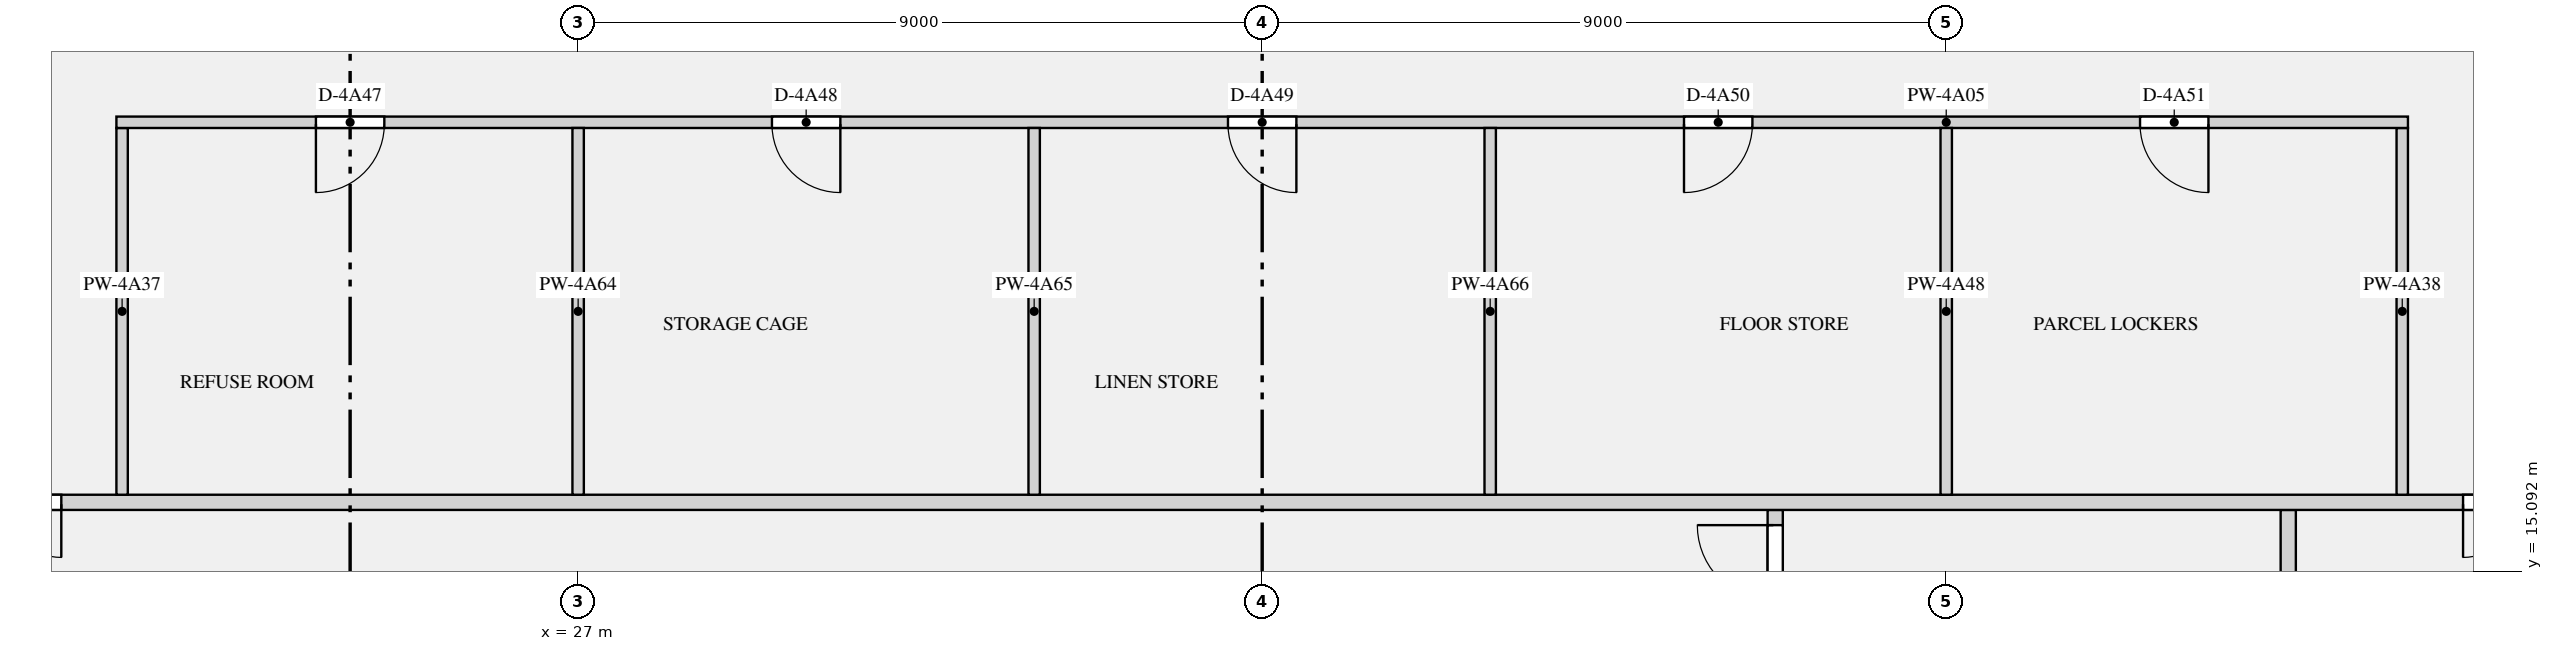
"""IFC4 building model, lengths in metres.
Left out: names, types, materials, properties, quantities, classifications, styles, units other than length and angle.
Written with IfcOpenShell. Run it as: python <this file> out.ifc"""

import sys

from ifc_helpers import new_model, si_unit, direction, frame, frame_2d, origin, place, context, subcontext, project, spatial, rectangle, extrude, element, fill, save


model = new_model("IFC4")
c1 = context("Model", 3, precision=1e-05, world=origin(), true_north=direction((0.0, 1.0)))
c2 = subcontext(c1, "Body", "Model", "MODEL_VIEW")
j1 = project(units=[si_unit("LENGTHUNIT", "METRE"), si_unit("PLANEANGLEUNIT", "RADIAN")], contexts=[c1])
p1 = place(None, origin())
s1 = spatial("IfcSite", under=j1, at=p1, CompositionType="ELEMENT")
p2 = place(p1, origin())
s2 = spatial("IfcBuilding", under=s1, at=p2, CompositionType="ELEMENT")
p3 = place(p2, frame((0.0, 0.0, 198.0)))
s3 = spatial("IfcBuildingStorey", under=s2, at=p3, CompositionType="ELEMENT", Elevation=198.0)
p4 = place(p3, frame((42.75, 12.5, 0.0), z_axis=(0.0, 0.0, 1.0), x_axis=(0.0, 1.0, 0.0)))
e1 = element("IfcWall", 1, at=p4, inside=s3, PredefinedType="PARTITIONING", context=c2, shape_type="SweptSolid", body=[
    extrude(rectangle(XDim=3.4, YDim=0.2, at=frame_2d((1.7, 0.0))), origin(), (0.0, 0.0, 1.0), 2.83),
])
p5 = place(p4, frame((2.2, 0.0, 0.0)))
e2 = element("IfcOpeningElement", 2, at=p5, cuts=e1, PredefinedType="OPENING", context=c2, shape_type="SweptSolid", body=[
    extrude(rectangle(XDim=1.0, YDim=2.1, at=frame_2d((0.5, 1.05))), frame((0.0, 0.11, 0.0), z_axis=(0.0, -1.0, 0.0), x_axis=(1.0, 0.0, 0.0)), (0.0, 0.0, 1.0), 0.22),
])
p6 = place(p3, frame((49.5, 12.5, 0.0), z_axis=(0.0, 0.0, 1.0), x_axis=(0.0, 1.0, 0.0)))
e3 = element("IfcWall", 3, at=p6, inside=s3, PredefinedType="PARTITIONING", context=c2, shape_type="SweptSolid", body=[
    extrude(rectangle(XDim=3.4, YDim=0.2, at=frame_2d((1.7, 0.0))), origin(), (0.0, 0.0, 1.0), 2.83),
])
p7 = place(p6, frame((1.15, 0.0, 0.0)))
e4 = element("IfcOpeningElement", 4, at=p7, cuts=e3, PredefinedType="OPENING", context=c2, shape_type="SweptSolid", body=[
    extrude(rectangle(XDim=1.1, YDim=2.1, at=frame_2d((0.55, 1.05))), frame((0.0, 0.11, 0.0), z_axis=(0.0, -1.0, 0.0), x_axis=(1.0, 0.0, 0.0)), (0.0, 0.0, 1.0), 0.22),
])
p8 = place(p3, frame((20.925, 21.0, 0.0), z_axis=(0.0, 0.0, 1.0), x_axis=(1.0, 0.0, 0.0)))
e5 = element("IfcWall", 5, at=p8, inside=s3, PredefinedType="PARTITIONING", context=c2, shape_type="SweptSolid", body=[
    extrude(rectangle(XDim=30.15, YDim=0.15, at=frame_2d((15.075, 0.0))), origin(), (0.0, 0.0, 1.0), 2.83),
])
p9 = place(p8, frame((2.625, 0.0, 0.0)))
e6 = element("IfcOpeningElement", 6, at=p9, cuts=e5, PredefinedType="OPENING", context=c2, shape_type="SweptSolid", body=[
    extrude(rectangle(XDim=0.9, YDim=2.1, at=frame_2d((0.45, 1.05))), frame((0.0, 0.085, 0.0), z_axis=(0.0, -1.0, 0.0), x_axis=(1.0, 0.0, 0.0)), (0.0, 0.0, 1.0), 0.17),
])
p10 = place(p8, frame((8.625, 0.0, 0.0)))
e7 = element("IfcOpeningElement", 7, at=p10, cuts=e5, PredefinedType="OPENING", context=c2, shape_type="SweptSolid", body=[
    extrude(rectangle(XDim=0.9, YDim=2.1, at=frame_2d((0.45, 1.05))), frame((0.0, 0.085, 0.0), z_axis=(0.0, -1.0, 0.0), x_axis=(1.0, 0.0, 0.0)), (0.0, 0.0, 1.0), 0.17),
])
p11 = place(p8, frame((14.625, 0.0, 0.0)))
e8 = element("IfcOpeningElement", 8, at=p11, cuts=e5, PredefinedType="OPENING", context=c2, shape_type="SweptSolid", body=[
    extrude(rectangle(XDim=0.9, YDim=2.1, at=frame_2d((0.45, 1.05))), frame((0.0, 0.085, 0.0), z_axis=(0.0, -1.0, 0.0), x_axis=(1.0, 0.0, 0.0)), (0.0, 0.0, 1.0), 0.17),
])
p12 = place(p8, frame((20.625, 0.0, 0.0)))
e9 = element("IfcOpeningElement", 9, at=p12, cuts=e5, PredefinedType="OPENING", context=c2, shape_type="SweptSolid", body=[
    extrude(rectangle(XDim=0.9, YDim=2.1, at=frame_2d((0.45, 1.05))), frame((0.0, 0.085, 0.0), z_axis=(0.0, -1.0, 0.0), x_axis=(1.0, 0.0, 0.0)), (0.0, 0.0, 1.0), 0.17),
])
p13 = place(p8, frame((26.625, 0.0, 0.0)))
e10 = element("IfcOpeningElement", 10, at=p13, cuts=e5, PredefinedType="OPENING", context=c2, shape_type="SweptSolid", body=[
    extrude(rectangle(XDim=0.9, YDim=2.1, at=frame_2d((0.45, 1.05))), frame((0.0, 0.085, 0.0), z_axis=(0.0, -1.0, 0.0), x_axis=(1.0, 0.0, 0.0)), (0.0, 0.0, 1.0), 0.17),
])
p14 = place(p3, frame((17.9, 16.0, 0.0), z_axis=(0.0, 0.0, 1.0), x_axis=(1.0, 0.0, 0.0)))
e11 = element("IfcWall", 11, at=p14, inside=s3, PredefinedType="PARTITIONING", context=c2, shape_type="SweptSolid", body=[
    extrude(rectangle(XDim=36.2, YDim=0.2, at=frame_2d((18.1, 0.0))), origin(), (0.0, 0.0, 1.0), 2.83),
])
p15 = place(p14, frame((0.9, 0.0, 0.0)))
e12 = element("IfcOpeningElement", 12, at=p15, cuts=e11, PredefinedType="OPENING", context=c2, shape_type="SweptSolid", body=[
    extrude(rectangle(XDim=1.4, YDim=2.1, at=frame_2d((0.7, 1.05))), frame((0.0, 0.11, 0.0), z_axis=(0.0, -1.0, 0.0), x_axis=(1.0, 0.0, 0.0)), (0.0, 0.0, 1.0), 0.22),
])
p16 = place(p14, frame((33.9, 0.0, 0.0)))
e13 = element("IfcOpeningElement", 13, at=p16, cuts=e11, PredefinedType="OPENING", context=c2, shape_type="SweptSolid", body=[
    extrude(rectangle(XDim=1.4, YDim=2.1, at=frame_2d((0.7, 1.05))), frame((0.0, 0.11, 0.0), z_axis=(0.0, -1.0, 0.0), x_axis=(1.0, 0.0, 0.0)), (0.0, 0.0, 1.0), 0.22),
])
for number, where, z_axis, x_axis in (
    (14, (21.0, 16.1, 0.0), (0.0, 0.0, 1.0), (0.0, 1.0, 0.0)),
    (15, (51.0, 16.1, 0.0), (0.0, 0.0, 1.0), (0.0, 1.0, 0.0)),
    (16, (45.0, 16.1, 0.0), (0.0, 0.0, 1.0), (0.0, 1.0, 0.0)),
    (17, (27.0, 16.1, 0.0), (0.0, 0.0, 1.0), (0.0, 1.0, 0.0)),
    (18, (33.0, 16.1, 0.0), (0.0, 0.0, 1.0), (0.0, 1.0, 0.0)),
    (19, (39.0, 16.1, 0.0), (0.0, 0.0, 1.0), (0.0, 1.0, 0.0)),
):
    element("IfcWall", number, at=place(p3, frame(where, z_axis=z_axis, x_axis=x_axis)), inside=s3, PredefinedType="PARTITIONING", context=c2, shape_type="SweptSolid", body=[
        extrude(rectangle(XDim=4.825, YDim=0.15, at=frame_2d((2.413, 0.0))), origin(), (0.0, 0.0, 1.0), 2.83),
    ])
p17 = place(p5, origin())
e20 = element("IfcDoor", 20, at=p17, inside=s3, OperationType="SINGLE_SWING_RIGHT", PredefinedType="DOOR", context=c2, shape_type="SweptSolid", body=[
    extrude(rectangle(XDim=1.0, YDim=2.1, at=frame_2d((0.5, 1.05))), frame((0.0, 0.025, 0.0), z_axis=(0.0, -1.0, 0.0), x_axis=(1.0, 0.0, 0.0)), (0.0, 0.0, 1.0), 0.05),
])
fill(e2, e20)
p18 = place(p15, frame((1.4, 0.0, 0.0), z_axis=(0.0, 0.0, 1.0), x_axis=(-1.0, 0.0, 0.0)))
e21 = element("IfcDoor", 21, at=p18, inside=s3, OperationType="DOUBLE_DOOR_SINGLE_SWING", PredefinedType="DOOR", context=c2, shape_type="SweptSolid", body=[
    extrude(rectangle(XDim=1.4, YDim=2.1, at=frame_2d((0.7, 1.05))), frame((0.0, 0.025, 0.0), z_axis=(0.0, -1.0, 0.0), x_axis=(1.0, 0.0, 0.0)), (0.0, 0.0, 1.0), 0.05),
])
fill(e12, e21)
p19 = place(p16, frame((1.4, 0.0, 0.0), z_axis=(0.0, 0.0, 1.0), x_axis=(-1.0, 0.0, 0.0)))
e22 = element("IfcDoor", 22, at=p19, inside=s3, OperationType="DOUBLE_DOOR_SINGLE_SWING", PredefinedType="DOOR", context=c2, shape_type="SweptSolid", body=[
    extrude(rectangle(XDim=1.4, YDim=2.1, at=frame_2d((0.7, 1.05))), frame((0.0, 0.025, 0.0), z_axis=(0.0, -1.0, 0.0), x_axis=(1.0, 0.0, 0.0)), (0.0, 0.0, 1.0), 0.05),
])
fill(e13, e22)
p20 = place(p9, frame((0.9, 0.0, 0.0), z_axis=(0.0, 0.0, 1.0), x_axis=(-1.0, 0.0, 0.0)))
e23 = element("IfcDoor", 23, at=p20, inside=s3, OperationType="SINGLE_SWING_RIGHT", PredefinedType="DOOR", context=c2, shape_type="SweptSolid", body=[
    extrude(rectangle(XDim=0.9, YDim=2.1, at=frame_2d((0.45, 1.05))), frame((0.0, 0.025, 0.0), z_axis=(0.0, -1.0, 0.0), x_axis=(1.0, 0.0, 0.0)), (0.0, 0.0, 1.0), 0.05),
])
fill(e6, e23)
p21 = place(p10, frame((0.9, 0.0, 0.0), z_axis=(0.0, 0.0, 1.0), x_axis=(-1.0, 0.0, 0.0)))
e24 = element("IfcDoor", 24, at=p21, inside=s3, OperationType="SINGLE_SWING_LEFT", PredefinedType="DOOR", context=c2, shape_type="SweptSolid", body=[
    extrude(rectangle(XDim=0.9, YDim=2.1, at=frame_2d((0.45, 1.05))), frame((0.0, 0.025, 0.0), z_axis=(0.0, -1.0, 0.0), x_axis=(1.0, 0.0, 0.0)), (0.0, 0.0, 1.0), 0.05),
])
fill(e7, e24)
p22 = place(p11, frame((0.9, 0.0, 0.0), z_axis=(0.0, 0.0, 1.0), x_axis=(-1.0, 0.0, 0.0)))
e25 = element("IfcDoor", 25, at=p22, inside=s3, OperationType="SINGLE_SWING_LEFT", PredefinedType="DOOR", context=c2, shape_type="SweptSolid", body=[
    extrude(rectangle(XDim=0.9, YDim=2.1, at=frame_2d((0.45, 1.05))), frame((0.0, 0.025, 0.0), z_axis=(0.0, -1.0, 0.0), x_axis=(1.0, 0.0, 0.0)), (0.0, 0.0, 1.0), 0.05),
])
fill(e8, e25)
p23 = place(p12, frame((0.9, 0.0, 0.0), z_axis=(0.0, 0.0, 1.0), x_axis=(-1.0, 0.0, 0.0)))
e26 = element("IfcDoor", 26, at=p23, inside=s3, OperationType="SINGLE_SWING_RIGHT", PredefinedType="DOOR", context=c2, shape_type="SweptSolid", body=[
    extrude(rectangle(XDim=0.9, YDim=2.1, at=frame_2d((0.45, 1.05))), frame((0.0, 0.025, 0.0), z_axis=(0.0, -1.0, 0.0), x_axis=(1.0, 0.0, 0.0)), (0.0, 0.0, 1.0), 0.05),
])
fill(e9, e26)
p24 = place(p13, frame((0.9, 0.0, 0.0), z_axis=(0.0, 0.0, 1.0), x_axis=(-1.0, 0.0, 0.0)))
e27 = element("IfcDoor", 27, at=p24, inside=s3, OperationType="SINGLE_SWING_LEFT", PredefinedType="DOOR", context=c2, shape_type="SweptSolid", body=[
    extrude(rectangle(XDim=0.9, YDim=2.1, at=frame_2d((0.45, 1.05))), frame((0.0, 0.025, 0.0), z_axis=(0.0, -1.0, 0.0), x_axis=(1.0, 0.0, 0.0)), (0.0, 0.0, 1.0), 0.05),
])
fill(e10, e27)
save(model, sys.argv[1])
